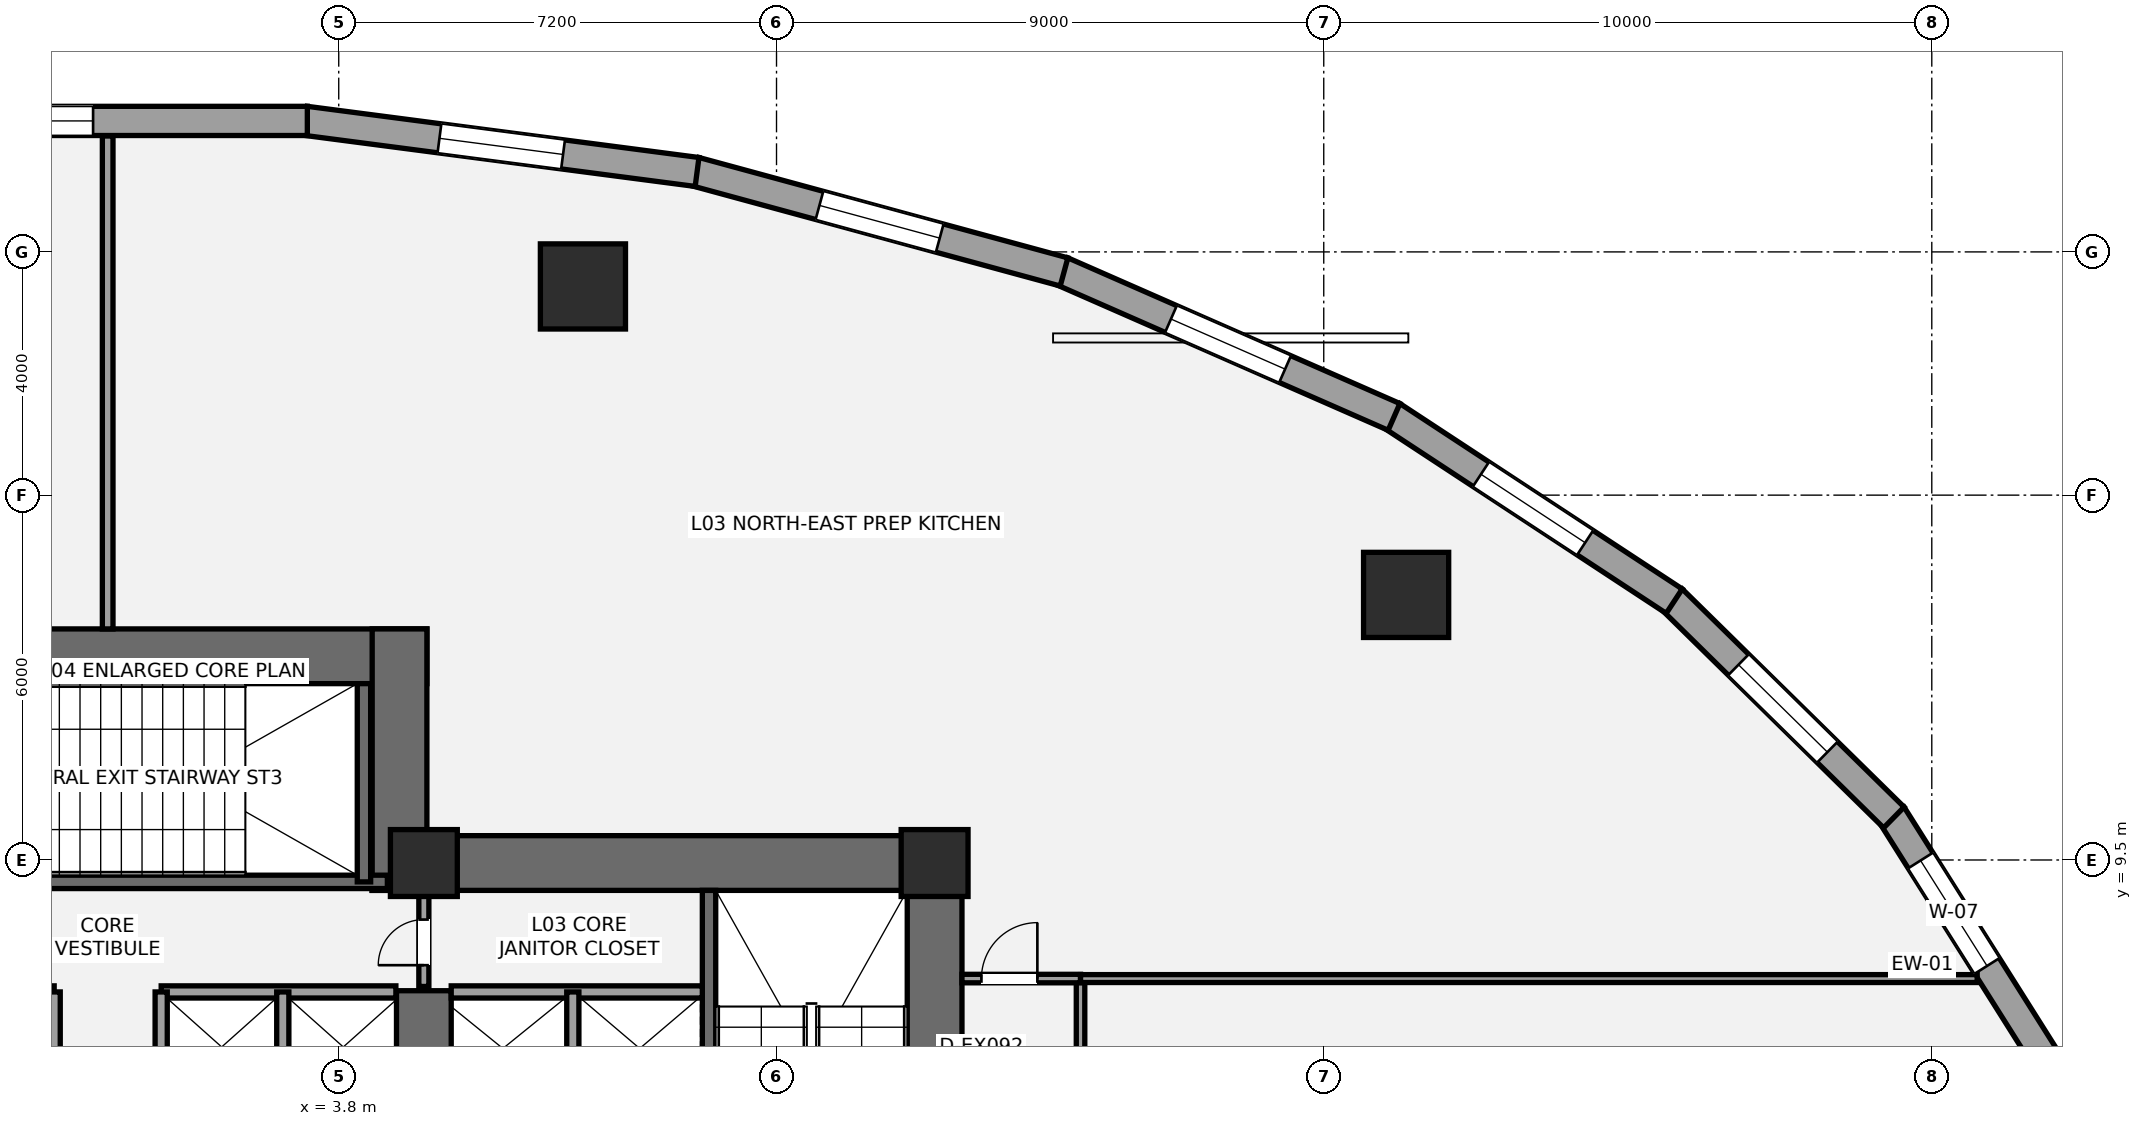
"""IFC4 building model, lengths in metres.
Left out: names, types, materials, properties, quantities, classifications, styles, units other than length and angle.
Written with IfcOpenShell. Run it as: python <this file> out.ifc"""

import sys

from ifc_helpers import new_model, si_unit, direction, frame, frame_2d, origin, origin_2d, place, context, subcontext, project, spatial, rectangle, hollow_circle, extrude, element, fill, save


model = new_model("IFC4")
c1 = context("Model", 3, precision=1e-05, world=origin(), true_north=direction((0.0, 1.0)))
c2 = subcontext(c1, "Body", "Model", "MODEL_VIEW")
j1 = project(units=[si_unit("LENGTHUNIT", "METRE"), si_unit("PLANEANGLEUNIT", "RADIAN")], contexts=[c1])
p1 = place(None, origin())
s1 = spatial("IfcSite", under=j1, at=p1, CompositionType="ELEMENT")
p2 = place(p1, origin())
s2 = spatial("IfcBuilding", under=s1, at=p2, CompositionType="ELEMENT")
p3 = place(p2, frame((0.0, 0.0, 14.4)))
s3 = spatial("IfcBuildingStorey", under=s2, at=p3, CompositionType="ELEMENT", Elevation=14.4)
p4 = place(p3, frame((13.6, 0.95, 0.0), z_axis=(0.0, 0.0, 1.0), x_axis=(0.0, 1.0, 0.0)))
e1 = element("IfcWall", 1, at=p4, inside=s3, PredefinedType="SHEAR", context=c2, shape_type="SweptSolid", body=[
    extrude(rectangle(XDim=8.95, YDim=0.9, at=frame_2d((4.475, 0.0))), origin(), (0.0, 0.0, 1.0), 4.2),
])
p5 = place(p3, frame((4.35, 9.45, 0.0), z_axis=(0.0, 0.0, 1.0), x_axis=(1.0, 0.0, 0.0)))
e2 = element("IfcWall", 2, at=p5, inside=s3, PredefinedType="SHEAR", context=c2, shape_type="SweptSolid", body=[
    extrude(rectangle(XDim=9.7, YDim=0.9, at=frame_2d((4.85, 0.0))), origin(), (0.0, 0.0, 1.0), 4.2),
])
p6 = place(p3, frame((5.2, 5.35, 0.0), z_axis=(0.0, 0.0, 1.0), x_axis=(0.0, 1.0, 0.0)))
e3 = element("IfcWall", 3, at=p6, inside=s3, PredefinedType="SHEAR", context=c2, shape_type="SweptSolid", body=[
    extrude(rectangle(XDim=2.0, YDim=0.9, at=frame_2d((1.0, 0.0))), origin(), (0.0, 0.0, 1.0), 4.2),
])
p7 = place(p3, frame((9.89, 1.85, 0.0), z_axis=(0.0, 0.0, 1.0), x_axis=(0.0, 1.0, 0.0)))
e4 = element("IfcWall", 4, at=p7, inside=s3, PredefinedType="SHEAR", context=c2, shape_type="SweptSolid", body=[
    extrude(rectangle(XDim=7.15, YDim=0.22, at=frame_2d((3.575, 0.0))), origin(), (0.0, 0.0, 1.0), 4.2),
])
p8 = place(p3, frame((-5.25, 12.85, 0.0), z_axis=(0.0, 0.0, 1.0), x_axis=(1.0, 0.0, 0.0)))
e5 = element("IfcWall", 5, at=p8, inside=s3, PredefinedType="SHEAR", context=c2, shape_type="SweptSolid", body=[
    extrude(rectangle(XDim=10.5, YDim=0.9, at=frame_2d((5.25, 0.0))), origin(), (0.0, 0.0, 1.0), 4.2),
])
p9 = place(p3, frame((4.8, 9.0, 0.0), z_axis=(0.0, 0.0, 1.0), x_axis=(0.0, 1.0, 0.0)))
e6 = element("IfcWall", 6, at=p9, inside=s3, PredefinedType="SHEAR", context=c2, shape_type="SweptSolid", body=[
    extrude(rectangle(XDim=4.3, YDim=0.9, at=frame_2d((2.15, 0.0))), origin(), (0.0, 0.0, 1.0), 4.2),
])
p10 = place(p3, frame((-4.7, 9.14, 0.0), z_axis=(0.0, 0.0, 1.0), x_axis=(1.0, 0.0, 0.0)))
e7 = element("IfcWall", 7, at=p10, inside=s3, PredefinedType="SHEAR", context=c2, shape_type="SweptSolid", body=[
    extrude(rectangle(XDim=9.3, YDim=0.22, at=frame_2d((4.65, 0.0))), origin(), (0.0, 0.0, 1.0), 4.2),
])
p11 = place(p10, frame((1.15, 0.0, 0.0)))
e8 = element("IfcOpeningElement", 8, at=p11, cuts=e7, PredefinedType="OPENING", context=c2, shape_type="SweptSolid", body=[
    extrude(rectangle(XDim=1.05, YDim=2.15, at=frame_2d((0.525, 1.075))), frame((0.0, 0.12, 0.0), z_axis=(0.0, -1.0, 0.0), x_axis=(1.0, 0.0, 0.0)), (0.0, 0.0, 1.0), 0.24),
])
p12 = place(p3, frame((4.215, 9.14, 0.0), z_axis=(0.0, 0.0, 1.0), x_axis=(0.0, 1.0, 0.0)))
e9 = element("IfcWall", 9, at=p12, inside=s3, PredefinedType="SHEAR", context=c2, shape_type="SweptSolid", body=[
    extrude(rectangle(XDim=3.26, YDim=0.22, at=frame_2d((1.63, 0.0))), origin(), (0.0, 0.0, 1.0), 4.2),
])
for number, where, z_axis, x_axis in (
    (10, (5.2, 9.45, 0.0), (0.0, 0.0, 1.0), (1.0, 0.0, 0.0)),
    (11, (13.6, 9.45, 0.0), (0.0, 0.0, 1.0), (1.0, 0.0, 0.0)),
):
    element("IfcColumn", number, at=place(p3, frame(where, z_axis=z_axis, x_axis=x_axis)), inside=s3, PredefinedType="COLUMN", context=c2, shape_type="SweptSolid", body=[
        extrude(rectangle(XDim=1.1, YDim=1.1, at=origin_2d()), origin(), (0.0, 0.0, 1.0), 4.2),
    ])
for number, where, z_axis, x_axis in (
    (12, (21.354, 13.859, 0.0), (0.0, 0.0, 1.0), (1.0, 0.0, 0.0)),
    (13, (7.816, 18.932, 0.0), (0.0, 0.0, 1.0), (1.0, 0.0, 0.0)),
):
    element("IfcColumn", number, at=place(p3, frame(where, z_axis=z_axis, x_axis=x_axis)), inside=s3, PredefinedType="USERDEFINED", context=c2, shape_type="SweptSolid", body=[
        extrude(hollow_circle(Radius=0.7, WallThickness=0.05, at=origin_2d()), origin(), (0.0, 0.0, 1.0), 4.2),
    ])
p13 = place(p3, frame((29.341, 10.243, 0.0), z_axis=(0.0, 0.0, 1.0), x_axis=(0.53349762721, -0.845801561693, 0.0)))
e14 = element("IfcWall", 14, at=p13, inside=s3, PredefinedType="STANDARD", context=c2, shape_type="SweptSolid", body=[
    extrude(rectangle(XDim=4.711, YDim=0.48, at=frame_2d((2.355, 0.0))), origin(), (0.0, 0.0, 1.0), 3.109),
])
p14 = place(p13, frame((0.888, 0.0, 0.72)))
e15 = element("IfcOpeningElement", 15, at=p14, cuts=e14, PredefinedType="OPENING", context=c2, shape_type="SweptSolid", body=[
    extrude(rectangle(XDim=2.05, YDim=1.8, at=frame_2d((1.025, 0.9))), frame((0.0, 0.25, 0.0), z_axis=(0.0, -1.0, 0.0), x_axis=(1.0, 0.0, 0.0)), (0.0, 0.0, 1.0), 0.5),
])
p15 = place(p3, frame((25.728, 13.785, 0.0), z_axis=(0.0, 0.0, 1.0), x_axis=(0.713189080178, -0.700971708355, 0.0)))
e16 = element("IfcWall", 16, at=p15, inside=s3, PredefinedType="STANDARD", context=c2, shape_type="SweptSolid", body=[
    extrude(rectangle(XDim=5.116, YDim=0.48, at=frame_2d((2.558, 0.0))), origin(), (0.0, 0.0, 1.0), 3.109),
])
p16 = place(p15, frame((1.533, 0.0, 0.72)))
e17 = element("IfcOpeningElement", 17, at=p16, cuts=e16, PredefinedType="OPENING", context=c2, shape_type="SweptSolid", body=[
    extrude(rectangle(XDim=2.05, YDim=1.8, at=frame_2d((1.025, 0.9))), frame((0.0, 0.25, 0.0), z_axis=(0.0, -1.0, 0.0), x_axis=(1.0, 0.0, 0.0)), (0.0, 0.0, 1.0), 0.5),
])
p17 = place(p3, frame((21.121, 16.806, 0.0), z_axis=(0.0, 0.0, 1.0), x_axis=(0.835863918172, -0.548936708827, 0.0)))
e18 = element("IfcWall", 18, at=p17, inside=s3, PredefinedType="STANDARD", context=c2, shape_type="SweptSolid", body=[
    extrude(rectangle(XDim=5.555, YDim=0.48, at=frame_2d((2.778, 0.0))), origin(), (0.0, 0.0, 1.0), 3.109),
])
p18 = place(p17, frame((1.753, 0.0, 0.72)))
e19 = element("IfcOpeningElement", 19, at=p18, cuts=e18, PredefinedType="OPENING", context=c2, shape_type="SweptSolid", body=[
    extrude(rectangle(XDim=2.05, YDim=1.8, at=frame_2d((1.025, 0.9))), frame((0.0, 0.25, 0.0), z_axis=(0.0, -1.0, 0.0), x_axis=(1.0, 0.0, 0.0)), (0.0, 0.0, 1.0), 0.5),
])
p19 = place(p3, frame((15.695, 19.183, 0.0), z_axis=(0.0, 0.0, 1.0), x_axis=(0.91570760638, -0.401845218484, 0.0)))
e20 = element("IfcWall", 20, at=p19, inside=s3, PredefinedType="STANDARD", context=c2, shape_type="SweptSolid", body=[
    extrude(rectangle(XDim=5.963, YDim=0.48, at=frame_2d((2.981, 0.0))), origin(), (0.0, 0.0, 1.0), 3.109),
])
p20 = place(p19, frame((1.957, 0.0, 0.72)))
e21 = element("IfcOpeningElement", 21, at=p20, cuts=e20, PredefinedType="OPENING", context=c2, shape_type="SweptSolid", body=[
    extrude(rectangle(XDim=2.05, YDim=1.8, at=frame_2d((1.025, 0.9))), frame((0.0, 0.25, 0.0), z_axis=(0.0, -1.0, 0.0), x_axis=(1.0, 0.0, 0.0)), (0.0, 0.0, 1.0), 0.5),
])
p21 = place(p3, frame((9.662, 20.821, 0.0), z_axis=(0.0, 0.0, 1.0), x_axis=(0.964936550718, -0.262483243445, 0.0)))
e22 = element("IfcWall", 22, at=p21, inside=s3, PredefinedType="STANDARD", context=c2, shape_type="SweptSolid", body=[
    extrude(rectangle(XDim=6.288, YDim=0.48, at=frame_2d((3.144, 0.0))), origin(), (0.0, 0.0, 1.0), 3.109),
])
p22 = place(p21, frame((2.119, 0.0, 0.72)))
e23 = element("IfcOpeningElement", 23, at=p22, cuts=e22, PredefinedType="OPENING", context=c2, shape_type="SweptSolid", body=[
    extrude(rectangle(XDim=2.05, YDim=1.8, at=frame_2d((1.025, 0.9))), frame((0.0, 0.25, 0.0), z_axis=(0.0, -1.0, 0.0), x_axis=(1.0, 0.0, 0.0)), (0.0, 0.0, 1.0), 0.5),
])
p23 = place(p3, frame((3.252, 21.656, 0.0), z_axis=(0.0, 0.0, 1.0), x_axis=(0.991576921472, -0.129519144545, 0.0)))
e24 = element("IfcWall", 24, at=p23, inside=s3, PredefinedType="STANDARD", context=c2, shape_type="SweptSolid", body=[
    extrude(rectangle(XDim=6.496, YDim=0.48, at=frame_2d((3.248, 0.0))), origin(), (0.0, 0.0, 1.0), 3.109),
])
p24 = place(p23, frame((2.223, 0.0, 0.72)))
e25 = element("IfcOpeningElement", 25, at=p24, cuts=e24, PredefinedType="OPENING", context=c2, shape_type="SweptSolid", body=[
    extrude(rectangle(XDim=2.05, YDim=1.8, at=frame_2d((1.025, 0.9))), frame((0.0, 0.25, 0.0), z_axis=(0.0, -1.0, 0.0), x_axis=(1.0, 0.0, 0.0)), (0.0, 0.0, 1.0), 0.5),
])
p25 = place(p3, frame((-3.284, 21.654, 0.0), z_axis=(0.0, 0.0, 1.0), x_axis=(1.0, 0.0, 0.0)))
e26 = element("IfcWall", 26, at=p25, inside=s3, PredefinedType="STANDARD", context=c2, shape_type="SweptSolid", body=[
    extrude(rectangle(XDim=6.567, YDim=0.48, at=frame_2d((3.284, 0.0))), origin(), (0.0, 0.0, 1.0), 3.109),
])
p26 = place(p25, frame((0.994, 0.0, 0.72)))
e27 = element("IfcOpeningElement", 27, at=p26, cuts=e26, PredefinedType="OPENING", context=c2, shape_type="SweptSolid", body=[
    extrude(rectangle(XDim=2.05, YDim=1.8, at=frame_2d((1.025, 0.9))), frame((0.0, 0.25, 0.0), z_axis=(0.0, -1.0, 0.0), x_axis=(1.0, 0.0, 0.0)), (0.0, 0.0, 1.0), 0.5),
])
p27 = place(p3, frame((5.65, 7.33, 0.0), z_axis=(0.0, 0.0, 1.0), x_axis=(1.0, 0.0, 0.0)))
e28 = element("IfcWall", 28, at=p27, inside=s3, PredefinedType="SOLIDWALL", context=c2, shape_type="SweptSolid", body=[
    extrude(rectangle(XDim=4.13, YDim=0.2, at=frame_2d((2.065, 0.0))), origin(), (0.0, 0.0, 1.0), 3.98),
])
p28 = place(p3, frame((7.65, 5.47, 0.0), z_axis=(0.0, 0.0, 1.0), x_axis=(0.0, 1.0, 0.0)))
e29 = element("IfcWall", 29, at=p28, inside=s3, PredefinedType="SOLIDWALL", context=c2, shape_type="SweptSolid", body=[
    extrude(rectangle(XDim=1.86, YDim=0.2, at=frame_2d((0.93, 0.0))), origin(), (0.0, 0.0, 1.0), 3.98),
])
for number, where, z_axis, x_axis in (
    (30, (-4.74, 7.33, 0.0), (0.0, 0.0, 1.0), (1.0, 0.0, 0.0)),
    (31, (0.88, 7.33, 0.0), (0.0, 0.0, 1.0), (1.0, 0.0, 0.0)),
):
    element("IfcWall", number, at=place(p3, frame(where, z_axis=z_axis, x_axis=x_axis)), inside=s3, PredefinedType="SOLIDWALL", context=c2, shape_type="SweptSolid", body=[
        extrude(rectangle(XDim=3.86, YDim=0.2, at=frame_2d((1.93, 0.0))), origin(), (0.0, 0.0, 1.0), 3.98),
    ])
for number, where, z_axis, x_axis in (
    (32, (2.88, 5.52, 0.0), (0.0, 0.0, 1.0), (0.0, 1.0, 0.0)),
    (33, (-0.88, 5.52, 0.0), (0.0, 0.0, 1.0), (0.0, 1.0, 0.0)),
    (34, (0.88, 5.52, 0.0), (0.0, 0.0, 1.0), (0.0, 1.0, 0.0)),
):
    element("IfcWall", number, at=place(p3, frame(where, z_axis=z_axis, x_axis=x_axis)), inside=s3, PredefinedType="SOLIDWALL", context=c2, shape_type="SweptSolid", body=[
        extrude(rectangle(XDim=1.81, YDim=0.2, at=frame_2d((0.905, 0.0))), origin(), (0.0, 0.0, 1.0), 3.98),
    ])
p29 = place(p3, frame((5.2, 7.42, 0.0), z_axis=(0.0, 0.0, 1.0), x_axis=(0.0, 1.0, 0.0)))
e35 = element("IfcWall", 35, at=p29, inside=s3, PredefinedType="PARTITIONING", context=c2, shape_type="SweptSolid", body=[
    extrude(rectangle(XDim=1.58, YDim=0.165, at=frame_2d((0.79, 0.0))), origin(), (0.0, 0.0, 1.0), 3.98),
])
p30 = place(p29, frame((0.35, 0.0, 0.0)))
e36 = element("IfcOpeningElement", 36, at=p30, cuts=e35, PredefinedType="OPENING", context=c2, shape_type="SweptSolid", body=[
    extrude(rectangle(XDim=0.75, YDim=2.1, at=frame_2d((0.375, 1.05))), frame((0.0, 0.093, 0.0), z_axis=(0.0, -1.0, 0.0), x_axis=(1.0, 0.0, 0.0)), (0.0, 0.0, 1.0), 0.185),
])
p31 = place(p3, frame((16.0, -18.778, 0.0), z_axis=(0.0, 0.0, 1.0), x_axis=(0.0, 1.0, 0.0)))
e37 = element("IfcWall", 37, at=p31, inside=s3, PredefinedType="PARTITIONING", context=c2, shape_type="SweptSolid", body=[
    extrude(rectangle(XDim=26.328, YDim=0.14, at=frame_2d((13.164, 0.0))), origin(), (0.0, 0.0, 1.0), 3.348),
])
p32 = place(p31, frame((13.628, 0.0, 0.0)))
e38 = element("IfcOpeningElement", 38, at=p32, cuts=e37, PredefinedType="OPENING", context=c2, shape_type="SweptSolid", body=[
    extrude(rectangle(XDim=0.9, YDim=2.1, at=frame_2d((0.45, 1.05))), frame((0.0, 0.08, 0.0), z_axis=(0.0, -1.0, 0.0), x_axis=(1.0, 0.0, 0.0)), (0.0, 0.0, 1.0), 0.16),
])
p33 = place(p31, frame((18.528, 0.0, 0.0)))
e39 = element("IfcOpeningElement", 39, at=p33, cuts=e37, PredefinedType="OPENING", context=c2, shape_type="SweptSolid", body=[
    extrude(rectangle(XDim=0.9, YDim=2.1, at=frame_2d((0.45, 1.05))), frame((0.0, 0.08, 0.0), z_axis=(0.0, -1.0, 0.0), x_axis=(1.0, 0.0, 0.0)), (0.0, 0.0, 1.0), 0.16),
])
p34 = place(p31, frame((23.403, 0.0, 0.0)))
e40 = element("IfcOpeningElement", 40, at=p34, cuts=e37, PredefinedType="OPENING", context=c2, shape_type="SweptSolid", body=[
    extrude(rectangle(XDim=0.9, YDim=2.1, at=frame_2d((0.45, 1.05))), frame((0.0, 0.08, 0.0), z_axis=(0.0, -1.0, 0.0), x_axis=(1.0, 0.0, 0.0)), (0.0, 0.0, 1.0), 0.16),
])
p35 = place(p3, frame((14.05, 7.55, 0.0), z_axis=(0.0, 0.0, 1.0), x_axis=(1.0, 0.0, 0.0)))
e41 = element("IfcWall", 41, at=p35, inside=s3, PredefinedType="PARTITIONING", context=c2, shape_type="SweptSolid", body=[
    extrude(rectangle(XDim=1.95, YDim=0.14, at=frame_2d((0.975, 0.0))), origin(), (0.0, 0.0, 1.0), 3.433),
])
p36 = place(p35, frame((0.32, 0.0, 0.0)))
e42 = element("IfcOpeningElement", 42, at=p36, cuts=e41, PredefinedType="OPENING", context=c2, shape_type="SweptSolid", body=[
    extrude(rectangle(XDim=0.92, YDim=2.15, at=frame_2d((0.46, 1.075))), frame((0.0, 0.08, 0.0), z_axis=(0.0, -1.0, 0.0), x_axis=(1.0, 0.0, 0.0)), (0.0, 0.0, 1.0), 0.16),
])
p37 = place(p3, frame((0.0, 13.3, 0.0), z_axis=(0.0, 0.0, 1.0), x_axis=(0.0, 1.0, 0.0)))
e43 = element("IfcWall", 43, at=p37, inside=s3, PredefinedType="PARTITIONING", context=c2, shape_type="SweptSolid", body=[
    extrude(rectangle(XDim=8.106, YDim=0.175, at=frame_2d((4.053, 0.0))), origin(), (0.0, 0.0, 1.0), 3.98),
])
p38 = place(p3, frame((16.0, 7.55, 0.0), z_axis=(0.0, 0.0, 1.0), x_axis=(1.0, 0.0, 0.0)))
e44 = element("IfcWall", 44, at=p38, inside=s3, PredefinedType="PARTITIONING", context=c2, shape_type="SweptSolid", body=[
    extrude(rectangle(XDim=14.747, YDim=0.13, at=frame_2d((7.373, 0.0))), origin(), (0.0, 0.0, 1.0), 2.958),
])
p39 = place(p14, origin())
e45 = element("IfcWindow", 45, at=p39, inside=s3, PartitioningType="SINGLE_PANEL", PredefinedType="WINDOW", context=c2, shape_type="SweptSolid", body=[
    extrude(rectangle(XDim=2.05, YDim=1.8, at=frame_2d((1.025, 0.9))), frame((0.0, -0.01, 0.0), z_axis=(0.0, -1.0, 0.0), x_axis=(1.0, 0.0, 0.0)), (0.0, 0.0, 1.0), 0.06),
])
fill(e15, e45)
p40 = place(p16, origin())
e46 = element("IfcWindow", 46, at=p40, inside=s3, PartitioningType="SINGLE_PANEL", PredefinedType="WINDOW", context=c2, shape_type="SweptSolid", body=[
    extrude(rectangle(XDim=2.05, YDim=1.8, at=frame_2d((1.025, 0.9))), frame((0.0, -0.01, 0.0), z_axis=(0.0, -1.0, 0.0), x_axis=(1.0, 0.0, 0.0)), (0.0, 0.0, 1.0), 0.06),
])
fill(e17, e46)
p41 = place(p18, origin())
e47 = element("IfcWindow", 47, at=p41, inside=s3, PartitioningType="SINGLE_PANEL", PredefinedType="WINDOW", context=c2, shape_type="SweptSolid", body=[
    extrude(rectangle(XDim=2.05, YDim=1.8, at=frame_2d((1.025, 0.9))), frame((0.0, -0.01, 0.0), z_axis=(0.0, -1.0, 0.0), x_axis=(1.0, 0.0, 0.0)), (0.0, 0.0, 1.0), 0.06),
])
fill(e19, e47)
p42 = place(p20, origin())
e48 = element("IfcWindow", 48, at=p42, inside=s3, PartitioningType="SINGLE_PANEL", PredefinedType="WINDOW", context=c2, shape_type="SweptSolid", body=[
    extrude(rectangle(XDim=2.05, YDim=1.8, at=frame_2d((1.025, 0.9))), frame((0.0, -0.01, 0.0), z_axis=(0.0, -1.0, 0.0), x_axis=(1.0, 0.0, 0.0)), (0.0, 0.0, 1.0), 0.06),
])
fill(e21, e48)
p43 = place(p22, origin())
e49 = element("IfcWindow", 49, at=p43, inside=s3, PartitioningType="SINGLE_PANEL", PredefinedType="WINDOW", context=c2, shape_type="SweptSolid", body=[
    extrude(rectangle(XDim=2.05, YDim=1.8, at=frame_2d((1.025, 0.9))), frame((0.0, -0.01, 0.0), z_axis=(0.0, -1.0, 0.0), x_axis=(1.0, 0.0, 0.0)), (0.0, 0.0, 1.0), 0.06),
])
fill(e23, e49)
p44 = place(p24, origin())
e50 = element("IfcWindow", 50, at=p44, inside=s3, PartitioningType="SINGLE_PANEL", PredefinedType="WINDOW", context=c2, shape_type="SweptSolid", body=[
    extrude(rectangle(XDim=2.05, YDim=1.8, at=frame_2d((1.025, 0.9))), frame((0.0, -0.01, 0.0), z_axis=(0.0, -1.0, 0.0), x_axis=(1.0, 0.0, 0.0)), (0.0, 0.0, 1.0), 0.06),
])
fill(e25, e50)
p45 = place(p26, origin())
e51 = element("IfcWindow", 51, at=p45, inside=s3, PartitioningType="SINGLE_PANEL", PredefinedType="WINDOW", context=c2, shape_type="SweptSolid", body=[
    extrude(rectangle(XDim=2.05, YDim=1.8, at=frame_2d((1.025, 0.9))), frame((0.0, -0.01, 0.0), z_axis=(0.0, -1.0, 0.0), x_axis=(1.0, 0.0, 0.0)), (0.0, 0.0, 1.0), 0.06),
])
fill(e27, e51)
p46 = place(p30, origin())
e52 = element("IfcDoor", 52, at=p46, inside=s3, OperationType="SINGLE_SWING_LEFT", PredefinedType="DOOR", context=c2, shape_type="SweptSolid", body=[
    extrude(rectangle(XDim=0.75, YDim=2.1, at=frame_2d((0.375, 1.05))), frame((0.0, 0.025, 0.0), z_axis=(0.0, -1.0, 0.0), x_axis=(1.0, 0.0, 0.0)), (0.0, 0.0, 1.0), 0.05),
])
fill(e36, e52)
p47 = place(p36, origin())
e53 = element("IfcDoor", 53, at=p47, inside=s3, OperationType="SINGLE_SWING_RIGHT", PredefinedType="DOOR", context=c2, shape_type="SweptSolid", body=[
    extrude(rectangle(XDim=0.92, YDim=2.15, at=frame_2d((0.46, 1.075))), frame((0.0, 0.025, 0.0), z_axis=(0.0, -1.0, 0.0), x_axis=(1.0, 0.0, 0.0)), (0.0, 0.0, 1.0), 0.05),
])
fill(e42, e53)
save(model, sys.argv[1])
